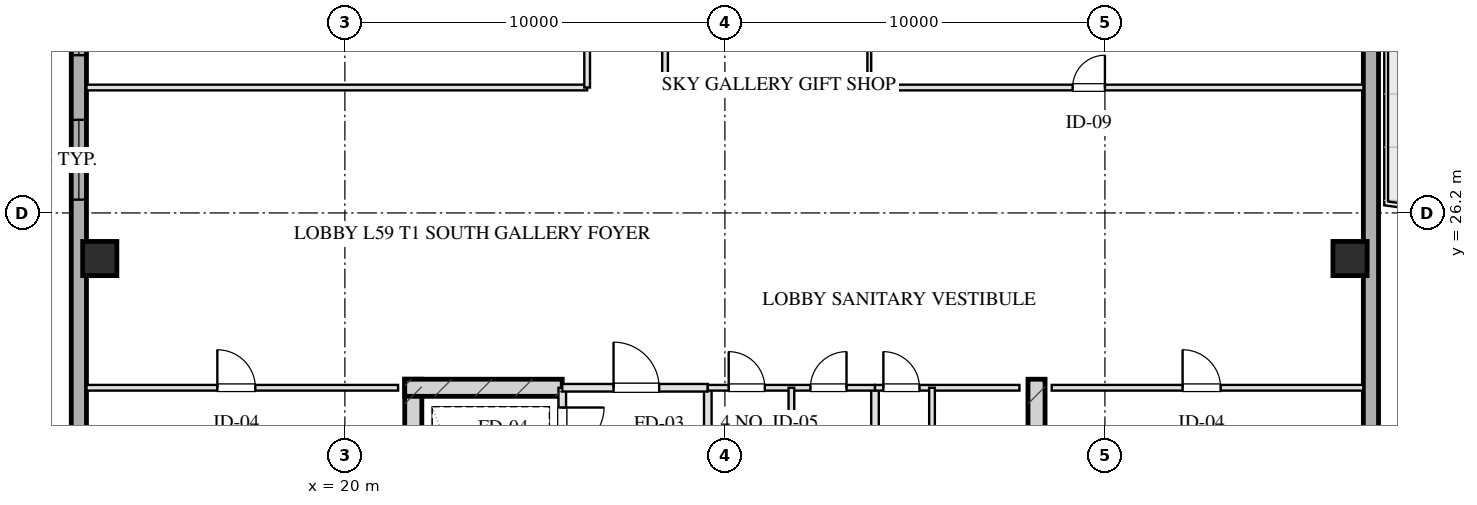
"""IFC4 building model, lengths in metres.
Left out: names, types, materials, properties, quantities, classifications, styles, units other than length and angle.
Written with IfcOpenShell. Run it as: python <this file> out.ifc"""

import sys

from ifc_helpers import new_model, si_unit, direction, frame, frame_2d, origin, origin_2d, place, context, subcontext, project, spatial, rectangle, hollow_rectangle, extrude, element, fill, save


model = new_model("IFC4")
c1 = context("Model", 3, precision=1e-05, world=origin(), true_north=direction((0.0, 1.0)))
c2 = subcontext(c1, "Body", "Model", "MODEL_VIEW")
j1 = project(units=[si_unit("LENGTHUNIT", "METRE"), si_unit("PLANEANGLEUNIT", "RADIAN")], contexts=[c1])
p1 = place(None, origin())
s1 = spatial("IfcSite", under=j1, at=p1, CompositionType="ELEMENT")
p2 = place(p1, origin())
s2 = spatial("IfcBuilding", under=s1, at=p2, CompositionType="ELEMENT")
p3 = place(p2, frame((0.0, 0.0, 219.65)))
s3 = spatial("IfcBuildingStorey", under=s2, at=p3, CompositionType="ELEMENT", Elevation=219.65)
for number, where, z_axis, x_axis in (
    (1, (21.8, 21.825, 0.0), (0.0, 0.0, 1.0), (0.0, -1.0, 0.0)),
    (2, (38.2, 21.825, 0.0), (0.0, 0.0, 1.0), (0.0, -1.0, 0.0)),
):
    element("IfcWall", number, at=place(p3, frame(where, z_axis=z_axis, x_axis=x_axis)), inside=s3, PredefinedType="SHEAR", context=c2, shape_type="SweptSolid", body=[
        extrude(rectangle(XDim=9.33, YDim=0.45, at=frame_2d((4.665, 0.0))), origin(), (0.0, 0.0, 1.0), 3.45),
    ])
p4 = place(p3, frame((21.575, 21.6, 0.0), z_axis=(0.0, 0.0, 1.0), x_axis=(1.0, 0.0, 0.0)))
e3 = element("IfcWall", 3, at=p4, inside=s3, PredefinedType="SHEAR", context=c2, shape_type="SweptSolid", body=[
    extrude(rectangle(XDim=4.145, YDim=0.45, at=frame_2d((2.073, 0.0))), origin(), (0.0, 0.0, 1.0), 3.45),
])
for number, where, z_axis, x_axis in (
    (4, (13.55, 25.0, 0.0), (0.0, 0.0, 1.0), (1.0, 0.0, 0.0)),
    (5, (46.45, 25.0, 0.0), (0.0, 0.0, 1.0), (1.0, 0.0, 0.0)),
):
    element("IfcColumn", number, at=place(p3, frame(where, z_axis=z_axis, x_axis=x_axis)), inside=s3, PredefinedType="COLUMN", context=c2, shape_type="SweptSolid", body=[
        extrude(hollow_rectangle(XDim=0.9, YDim=0.9, WallThickness=0.032, at=origin_2d()), origin(), (0.0, 0.0, 1.0), 3.451),
    ])
p5 = place(p3, frame((13.0, 10.8, 0.0), z_axis=(0.0, 0.0, 1.0), x_axis=(0.0, 1.0, 0.0)))
e6 = element("IfcWall", 6, at=p5, inside=s3, PredefinedType="SOLIDWALL", context=c2, shape_type="SweptSolid", body=[
    extrude(rectangle(XDim=46.4, YDim=0.4, at=frame_2d((23.2, 0.0))), origin(), (0.0, 0.0, 1.0), 2.61),
])
p6 = place(p5, frame((15.75, 0.0, 0.75)))
e7 = element("IfcOpeningElement", 7, at=p6, cuts=e6, PredefinedType="OPENING", context=c2, shape_type="SweptSolid", body=[
    extrude(rectangle(XDim=2.1, YDim=1.46, at=frame_2d((1.05, 0.73))), frame((0.0, 0.21, 0.0), z_axis=(0.0, -1.0, 0.0), x_axis=(1.0, 0.0, 0.0)), (0.0, 0.0, 1.0), 0.42),
])
p7 = place(p5, frame((19.55, 0.0, 0.75)))
e8 = element("IfcOpeningElement", 8, at=p7, cuts=e6, PredefinedType="OPENING", context=c2, shape_type="SweptSolid", body=[
    extrude(rectangle(XDim=2.1, YDim=1.46, at=frame_2d((1.05, 0.73))), frame((0.0, 0.21, 0.0), z_axis=(0.0, -1.0, 0.0), x_axis=(1.0, 0.0, 0.0)), (0.0, 0.0, 1.0), 0.42),
])
p8 = place(p5, frame((24.75, 0.0, 0.75)))
e9 = element("IfcOpeningElement", 9, at=p8, cuts=e6, PredefinedType="OPENING", context=c2, shape_type="SweptSolid", body=[
    extrude(rectangle(XDim=2.1, YDim=1.46, at=frame_2d((1.05, 0.73))), frame((0.0, 0.21, 0.0), z_axis=(0.0, -1.0, 0.0), x_axis=(1.0, 0.0, 0.0)), (0.0, 0.0, 1.0), 0.42),
])
p9 = place(p5, frame((28.55, 0.0, 0.75)))
e10 = element("IfcOpeningElement", 10, at=p9, cuts=e6, PredefinedType="OPENING", context=c2, shape_type="SweptSolid", body=[
    extrude(rectangle(XDim=2.1, YDim=1.46, at=frame_2d((1.05, 0.73))), frame((0.0, 0.21, 0.0), z_axis=(0.0, -1.0, 0.0), x_axis=(1.0, 0.0, 0.0)), (0.0, 0.0, 1.0), 0.42),
])
p10 = place(p3, frame((47.0, 57.2, 0.0), z_axis=(0.0, 0.0, 1.0), x_axis=(0.0, -1.0, 0.0)))
e11 = element("IfcWall", 11, at=p10, inside=s3, PredefinedType="SOLIDWALL", context=c2, shape_type="SweptSolid", body=[
    extrude(rectangle(XDim=46.4, YDim=0.4, at=frame_2d((23.2, 0.0))), origin(), (0.0, 0.0, 1.0), 2.61),
])
p11 = place(p10, frame((20.85, 0.0, 0.0)))
e12 = element("IfcOpeningElement", 12, at=p11, cuts=e11, PredefinedType="OPENING", context=c2, shape_type="SweptSolid", body=[
    extrude(rectangle(XDim=1.8, YDim=2.2, at=frame_2d((0.9, 1.1))), frame((0.0, 0.21, 0.0), z_axis=(0.0, -1.0, 0.0), x_axis=(1.0, 0.0, 0.0)), (0.0, 0.0, 1.0), 0.42),
])
p12 = place(p3, frame((77.453, 26.664, 0.0), z_axis=(0.0, 0.0, 1.0), x_axis=(-0.990242401523, 0.13935561067, 0.0)))
e13 = element("IfcWall", 13, at=p12, inside=s3, PredefinedType="SOLIDWALL", context=c2, shape_type="SweptSolid", body=[
    extrude(rectangle(XDim=30.399, YDim=0.35, at=frame_2d((15.2, 0.0))), origin(), (0.0, 0.0, 1.0), 3.4),
])
p13 = place(p12, frame((6.5, 0.0, 0.0)))
e14 = element("IfcOpeningElement", 14, at=p13, cuts=e13, PredefinedType="OPENING", context=c2, shape_type="SweptSolid", body=[
    extrude(rectangle(XDim=1.1, YDim=2.15, at=frame_2d((0.55, 1.075))), frame((0.0, 0.185, 0.0), z_axis=(0.0, -1.0, 0.0), x_axis=(1.0, 0.0, 0.0)), (0.0, 0.0, 1.0), 0.37),
])
p14 = place(p3, frame((25.72, 21.6, 0.0), z_axis=(0.0, 0.0, 1.0), x_axis=(0.0, -1.0, 0.0)))
e15 = element("IfcWall", 15, at=p14, inside=s3, PredefinedType="PARTITIONING", context=c2, shape_type="SweptSolid", body=[
    extrude(rectangle(XDim=1.9, YDim=0.2, at=frame_2d((0.95, 0.0))), origin(), (0.0, 0.0, 1.0), 3.175),
])
p15 = place(p14, frame((0.52, 0.0, 0.0)))
e16 = element("IfcOpeningElement", 16, at=p15, cuts=e15, PredefinedType="OPENING", context=c2, shape_type="SweptSolid", body=[
    extrude(rectangle(XDim=1.1, YDim=2.05, at=frame_2d((0.55, 1.025))), frame((0.0, 0.11, 0.0), z_axis=(0.0, -1.0, 0.0), x_axis=(1.0, 0.0, 0.0)), (0.0, 0.0, 1.0), 0.22),
])
p16 = place(p3, frame((29.55, 21.6, 0.0), z_axis=(0.0, 0.0, 1.0), x_axis=(0.0, -1.0, 0.0)))
e17 = element("IfcWall", 17, at=p16, inside=s3, PredefinedType="PARTITIONING", context=c2, shape_type="SweptSolid", body=[
    extrude(rectangle(XDim=8.43, YDim=0.2, at=frame_2d((4.215, 0.0))), origin(), (0.0, 0.0, 1.0), 3.175),
])
p17 = place(p3, frame((25.72, 21.6, 0.0), z_axis=(0.0, 0.0, 1.0), x_axis=(1.0, 0.0, 0.0)))
e18 = element("IfcWall", 18, at=p17, inside=s3, PredefinedType="PARTITIONING", context=c2, shape_type="SweptSolid", body=[
    extrude(rectangle(XDim=3.83, YDim=0.2, at=frame_2d((1.915, 0.0))), origin(), (0.0, 0.0, 1.0), 3.175),
])
p18 = place(p17, frame((1.35, 0.0, 0.0)))
e19 = element("IfcOpeningElement", 19, at=p18, cuts=e18, PredefinedType="OPENING", context=c2, shape_type="SweptSolid", body=[
    extrude(rectangle(XDim=1.2, YDim=2.05, at=frame_2d((0.6, 1.025))), frame((0.0, 0.11, 0.0), z_axis=(0.0, -1.0, 0.0), x_axis=(1.0, 0.0, 0.0)), (0.0, 0.0, 1.0), 0.22),
])
p19 = place(p3, frame((33.95, 21.6, 0.0), z_axis=(0.0, 0.0, 1.0), x_axis=(0.0, -1.0, 0.0)))
e20 = element("IfcWall", 20, at=p19, inside=s3, PredefinedType="PARTITIONING", context=c2, shape_type="SweptSolid", body=[
    extrude(rectangle(XDim=8.43, YDim=0.2, at=frame_2d((4.215, 0.0))), origin(), (0.0, 0.0, 1.0), 3.175),
])
p20 = place(p3, frame((29.55, 21.6, 0.0), z_axis=(0.0, 0.0, 1.0), x_axis=(1.0, 0.0, 0.0)))
e21 = element("IfcWall", 21, at=p20, inside=s3, PredefinedType="PARTITIONING", context=c2, shape_type="SweptSolid", body=[
    extrude(rectangle(XDim=4.4, YDim=0.15, at=frame_2d((2.2, 0.0))), origin(), (0.0, 0.0, 1.0), 3.175),
])
p21 = place(p20, frame((0.55, 0.0, 0.0)))
e22 = element("IfcOpeningElement", 22, at=p21, cuts=e21, PredefinedType="OPENING", context=c2, shape_type="SweptSolid", body=[
    extrude(rectangle(XDim=0.95, YDim=2.05, at=frame_2d((0.475, 1.025))), frame((0.0, 0.085, 0.0), z_axis=(0.0, -1.0, 0.0), x_axis=(1.0, 0.0, 0.0)), (0.0, 0.0, 1.0), 0.17),
])
p22 = place(p20, frame((2.7, 0.0, 0.0)))
e23 = element("IfcOpeningElement", 23, at=p22, cuts=e21, PredefinedType="OPENING", context=c2, shape_type="SweptSolid", body=[
    extrude(rectangle(XDim=0.95, YDim=2.05, at=frame_2d((0.475, 1.025))), frame((0.0, 0.085, 0.0), z_axis=(0.0, -1.0, 0.0), x_axis=(1.0, 0.0, 0.0)), (0.0, 0.0, 1.0), 0.17),
])
p23 = place(p3, frame((31.75, 21.6, 0.0), z_axis=(0.0, 0.0, 1.0), x_axis=(0.0, -1.0, 0.0)))
e24 = element("IfcWall", 24, at=p23, inside=s3, PredefinedType="PARTITIONING", context=c2, shape_type="SweptSolid", body=[
    extrude(rectangle(XDim=8.43, YDim=0.15, at=frame_2d((4.215, 0.0))), origin(), (0.0, 0.0, 1.0), 3.175),
])
p24 = place(p3, frame((33.95, 21.6, 0.0), z_axis=(0.0, 0.0, 1.0), x_axis=(1.0, 0.0, 0.0)))
e25 = element("IfcWall", 25, at=p24, inside=s3, PredefinedType="PARTITIONING", context=c2, shape_type="SweptSolid", body=[
    extrude(rectangle(XDim=3.8, YDim=0.15, at=frame_2d((1.9, 0.0))), origin(), (0.0, 0.0, 1.0), 3.175),
])
p25 = place(p24, frame((0.22, 0.0, 0.0)))
e26 = element("IfcOpeningElement", 26, at=p25, cuts=e25, PredefinedType="OPENING", context=c2, shape_type="SweptSolid", body=[
    extrude(rectangle(XDim=0.95, YDim=2.05, at=frame_2d((0.475, 1.025))), frame((0.0, 0.085, 0.0), z_axis=(0.0, -1.0, 0.0), x_axis=(1.0, 0.0, 0.0)), (0.0, 0.0, 1.0), 0.17),
])
p26 = place(p3, frame((35.45, 21.6, 0.0), z_axis=(0.0, 0.0, 1.0), x_axis=(0.0, -1.0, 0.0)))
e27 = element("IfcWall", 27, at=p26, inside=s3, PredefinedType="PARTITIONING", context=c2, shape_type="SweptSolid", body=[
    extrude(rectangle(XDim=8.43, YDim=0.15, at=frame_2d((4.215, 0.0))), origin(), (0.0, 0.0, 1.0), 2.815),
])
p27 = place(p26, frame((2.55, 0.0, 0.0)))
e28 = element("IfcOpeningElement", 28, at=p27, cuts=e27, PredefinedType="OPENING", context=c2, shape_type="SweptSolid", body=[
    extrude(rectangle(XDim=0.95, YDim=2.05, at=frame_2d((0.475, 1.025))), frame((0.0, 0.085, 0.0), z_axis=(0.0, -1.0, 0.0), x_axis=(1.0, 0.0, 0.0)), (0.0, 0.0, 1.0), 0.17),
])
p28 = place(p26, frame((4.7, 0.0, 0.0)))
e29 = element("IfcOpeningElement", 29, at=p28, cuts=e27, PredefinedType="OPENING", context=c2, shape_type="SweptSolid", body=[
    extrude(rectangle(XDim=0.9, YDim=2.05, at=frame_2d((0.45, 1.025))), frame((0.0, 0.085, 0.0), z_axis=(0.0, -1.0, 0.0), x_axis=(1.0, 0.0, 0.0)), (0.0, 0.0, 1.0), 0.17),
])
p29 = place(p26, frame((6.8, 0.0, 0.0)))
e30 = element("IfcOpeningElement", 30, at=p29, cuts=e27, PredefinedType="OPENING", context=c2, shape_type="SweptSolid", body=[
    extrude(rectangle(XDim=0.9, YDim=2.05, at=frame_2d((0.45, 1.025))), frame((0.0, 0.085, 0.0), z_axis=(0.0, -1.0, 0.0), x_axis=(1.0, 0.0, 0.0)), (0.0, 0.0, 1.0), 0.17),
])
p30 = place(p3, frame((13.2, 21.6, 0.0), z_axis=(0.0, 0.0, 1.0), x_axis=(1.0, 0.0, 0.0)))
e31 = element("IfcWall", 31, at=p30, inside=s3, PredefinedType="PARTITIONING", context=c2, shape_type="SweptSolid", body=[
    extrude(rectangle(XDim=8.2, YDim=0.15, at=frame_2d((4.1, 0.0))), origin(), (0.0, 0.0, 1.0), 3.175),
])
p31 = place(p30, frame((3.444, 0.0, 0.0)))
e32 = element("IfcOpeningElement", 32, at=p31, cuts=e31, PredefinedType="OPENING", context=c2, shape_type="SweptSolid", body=[
    extrude(rectangle(XDim=1.0, YDim=2.05, at=frame_2d((0.5, 1.025))), frame((0.0, 0.085, 0.0), z_axis=(0.0, -1.0, 0.0), x_axis=(1.0, 0.0, 0.0)), (0.0, 0.0, 1.0), 0.17),
])
p32 = place(p3, frame((38.6, 21.6, 0.0), z_axis=(0.0, 0.0, 1.0), x_axis=(1.0, 0.0, 0.0)))
e33 = element("IfcWall", 33, at=p32, inside=s3, PredefinedType="PARTITIONING", context=c2, shape_type="SweptSolid", body=[
    extrude(rectangle(XDim=8.2, YDim=0.15, at=frame_2d((4.1, 0.0))), origin(), (0.0, 0.0, 1.0), 3.175),
])
p33 = place(p32, frame((3.444, 0.0, 0.0)))
e34 = element("IfcOpeningElement", 34, at=p33, cuts=e33, PredefinedType="OPENING", context=c2, shape_type="SweptSolid", body=[
    extrude(rectangle(XDim=1.0, YDim=2.05, at=frame_2d((0.5, 1.025))), frame((0.0, 0.085, 0.0), z_axis=(0.0, -1.0, 0.0), x_axis=(1.0, 0.0, 0.0)), (0.0, 0.0, 1.0), 0.17),
])
p34 = place(p3, frame((13.2, 29.5, 0.0), z_axis=(0.0, 0.0, 1.0), x_axis=(1.0, 0.0, 0.0)))
e35 = element("IfcWall", 35, at=p34, inside=s3, PredefinedType="PARTITIONING", context=c2, shape_type="SweptSolid", body=[
    extrude(rectangle(XDim=13.175, YDim=0.15, at=frame_2d((6.587, 0.0))), origin(), (0.0, 0.0, 1.0), 3.175),
])
p35 = place(p3, frame((28.425, 29.5, 0.0), z_axis=(0.0, 0.0, 1.0), x_axis=(1.0, 0.0, 0.0)))
e36 = element("IfcWall", 36, at=p35, inside=s3, PredefinedType="PARTITIONING", context=c2, shape_type="SweptSolid", body=[
    extrude(rectangle(XDim=18.375, YDim=0.15, at=frame_2d((9.188, 0.0))), origin(), (0.0, 0.0, 1.0), 3.175),
])
p36 = place(p35, frame((10.725, 0.0, 0.0)))
e37 = element("IfcOpeningElement", 37, at=p36, cuts=e36, PredefinedType="OPENING", context=c2, shape_type="SweptSolid", body=[
    extrude(rectangle(XDim=0.85, YDim=2.05, at=frame_2d((0.425, 1.025))), frame((0.0, 0.085, 0.0), z_axis=(0.0, -1.0, 0.0), x_axis=(1.0, 0.0, 0.0)), (0.0, 0.0, 1.0), 0.17),
])
p37 = place(p3, frame((26.375, 29.5, 0.0), z_axis=(0.0, 0.0, 1.0), x_axis=(0.0, 1.0, 0.0)))
e38 = element("IfcWall", 38, at=p37, inside=s3, PredefinedType="PARTITIONING", context=c2, shape_type="SweptSolid", body=[
    extrude(rectangle(XDim=9.0, YDim=0.15, at=frame_2d((4.5, 0.0))), origin(), (0.0, 0.0, 1.0), 3.175),
])
p38 = place(p37, frame((1.16, 0.0, 0.0)))
e39 = element("IfcOpeningElement", 39, at=p38, cuts=e38, PredefinedType="OPENING", context=c2, shape_type="SweptSolid", body=[
    extrude(rectangle(XDim=1.0, YDim=2.05, at=frame_2d((0.5, 1.025))), frame((0.0, 0.085, 0.0), z_axis=(0.0, -1.0, 0.0), x_axis=(1.0, 0.0, 0.0)), (0.0, 0.0, 1.0), 0.17),
])
p39 = place(p37, frame((5.66, 0.0, 0.0)))
e40 = element("IfcOpeningElement", 40, at=p39, cuts=e38, PredefinedType="OPENING", context=c2, shape_type="SweptSolid", body=[
    extrude(rectangle(XDim=1.05, YDim=2.05, at=frame_2d((0.525, 1.025))), frame((0.0, 0.085, 0.0), z_axis=(0.0, -1.0, 0.0), x_axis=(1.0, 0.0, 0.0)), (0.0, 0.0, 1.0), 0.17),
])
p40 = place(p3, frame((28.425, 29.5, 0.0), z_axis=(0.0, 0.0, 1.0), x_axis=(0.0, 1.0, 0.0)))
e41 = element("IfcWall", 41, at=p40, inside=s3, PredefinedType="PARTITIONING", context=c2, shape_type="SweptSolid", body=[
    extrude(rectangle(XDim=9.0, YDim=0.15, at=frame_2d((4.5, 0.0))), origin(), (0.0, 0.0, 1.0), 3.175),
])
p41 = place(p40, frame((1.16, 0.0, 0.0)))
e42 = element("IfcOpeningElement", 42, at=p41, cuts=e41, PredefinedType="OPENING", context=c2, shape_type="SweptSolid", body=[
    extrude(rectangle(XDim=1.0, YDim=2.05, at=frame_2d((0.5, 1.025))), frame((0.0, 0.085, 0.0), z_axis=(0.0, -1.0, 0.0), x_axis=(1.0, 0.0, 0.0)), (0.0, 0.0, 1.0), 0.17),
])
p42 = place(p40, frame((5.56, 0.0, 0.0)))
e43 = element("IfcOpeningElement", 43, at=p42, cuts=e41, PredefinedType="OPENING", context=c2, shape_type="SweptSolid", body=[
    extrude(rectangle(XDim=1.2, YDim=2.05, at=frame_2d((0.6, 1.025))), frame((0.0, 0.085, 0.0), z_axis=(0.0, -1.0, 0.0), x_axis=(1.0, 0.0, 0.0)), (0.0, 0.0, 1.0), 0.17),
])
p43 = place(p3, frame((33.8, 29.5, 0.0), z_axis=(0.0, 0.0, 1.0), x_axis=(0.0, 1.0, 0.0)))
e44 = element("IfcWall", 44, at=p43, inside=s3, PredefinedType="MOVABLE", context=c2, shape_type="SweptSolid", body=[
    extrude(rectangle(XDim=3.32, YDim=0.1, at=frame_2d((1.66, 0.0))), origin(), (0.0, 0.0, 1.0), 3.175),
])
p44 = place(p3, frame((46.45, 34.5, 0.0), z_axis=(0.0, 0.0, 1.0), x_axis=(0.988149988354, -0.153491369519, 0.0)))
e45 = element("IfcWall", 45, at=p44, inside=s3, PredefinedType="MOVABLE", context=c2, shape_type="SweptSolid", body=[
    extrude(rectangle(XDim=29.405, YDim=0.1, at=frame_2d((14.703, 0.0))), origin(), (0.0, 0.0, 1.0), 3.175),
])
p45 = place(p44, frame((3.2, 0.0, 0.0)))
e46 = element("IfcOpeningElement", 46, at=p45, cuts=e45, PredefinedType="OPENING", context=c2, shape_type="SweptSolid", body=[
    extrude(rectangle(XDim=1.0, YDim=2.05, at=frame_2d((0.5, 1.025))), frame((0.0, 0.06, 0.0), z_axis=(0.0, -1.0, 0.0), x_axis=(1.0, 0.0, 0.0)), (0.0, 0.0, 1.0), 0.12),
])
p46 = place(p44, frame((10.5, 0.0, 0.0)))
e47 = element("IfcOpeningElement", 47, at=p46, cuts=e45, PredefinedType="OPENING", context=c2, shape_type="SweptSolid", body=[
    extrude(rectangle(XDim=1.1, YDim=2.05, at=frame_2d((0.55, 1.025))), frame((0.0, 0.06, 0.0), z_axis=(0.0, -1.0, 0.0), x_axis=(1.0, 0.0, 0.0)), (0.0, 0.0, 1.0), 0.12),
])
p47 = place(p44, frame((22.8, 0.0, 0.0)))
e48 = element("IfcOpeningElement", 48, at=p47, cuts=e45, PredefinedType="OPENING", context=c2, shape_type="SweptSolid", body=[
    extrude(rectangle(XDim=1.1, YDim=2.05, at=frame_2d((0.55, 1.025))), frame((0.0, 0.06, 0.0), z_axis=(0.0, -1.0, 0.0), x_axis=(1.0, 0.0, 0.0)), (0.0, 0.0, 1.0), 0.12),
])
p48 = place(p6, origin())
e49 = element("IfcWindow", 49, at=p48, inside=s3, PartitioningType="TRIPLE_PANEL_VERTICAL", PredefinedType="WINDOW", context=c2, shape_type="SweptSolid", body=[
    extrude(rectangle(XDim=2.1, YDim=1.46, at=frame_2d((1.05, 0.73))), frame((0.0, 0.03, 0.0), z_axis=(0.0, -1.0, 0.0), x_axis=(1.0, 0.0, 0.0)), (0.0, 0.0, 1.0), 0.06),
])
fill(e7, e49)
p49 = place(p7, origin())
e50 = element("IfcWindow", 50, at=p49, inside=s3, PartitioningType="TRIPLE_PANEL_VERTICAL", PredefinedType="WINDOW", context=c2, shape_type="SweptSolid", body=[
    extrude(rectangle(XDim=2.1, YDim=1.46, at=frame_2d((1.05, 0.73))), frame((0.0, 0.03, 0.0), z_axis=(0.0, -1.0, 0.0), x_axis=(1.0, 0.0, 0.0)), (0.0, 0.0, 1.0), 0.06),
])
fill(e8, e50)
p50 = place(p15, origin())
e51 = element("IfcDoor", 51, at=p50, inside=s3, OperationType="SINGLE_SWING_LEFT", PredefinedType="DOOR", context=c2, shape_type="SweptSolid", body=[
    extrude(rectangle(XDim=1.1, YDim=2.05, at=frame_2d((0.55, 1.025))), frame((0.0, 0.025, 0.0), z_axis=(0.0, -1.0, 0.0), x_axis=(1.0, 0.0, 0.0)), (0.0, 0.0, 1.0), 0.05),
])
fill(e16, e51)
p51 = place(p18, origin())
e52 = element("IfcDoor", 52, at=p51, inside=s3, OperationType="SINGLE_SWING_LEFT", PredefinedType="DOOR", context=c2, shape_type="SweptSolid", body=[
    extrude(rectangle(XDim=1.2, YDim=2.05, at=frame_2d((0.6, 1.025))), frame((0.0, 0.025, 0.0), z_axis=(0.0, -1.0, 0.0), x_axis=(1.0, 0.0, 0.0)), (0.0, 0.0, 1.0), 0.05),
])
fill(e19, e52)
p52 = place(p21, origin())
e53 = element("IfcDoor", 53, at=p52, inside=s3, OperationType="SINGLE_SWING_LEFT", PredefinedType="DOOR", context=c2, shape_type="SweptSolid", body=[
    extrude(rectangle(XDim=0.95, YDim=2.05, at=frame_2d((0.475, 1.025))), frame((0.0, 0.025, 0.0), z_axis=(0.0, -1.0, 0.0), x_axis=(1.0, 0.0, 0.0)), (0.0, 0.0, 1.0), 0.05),
])
fill(e22, e53)
p53 = place(p22, origin())
e54 = element("IfcDoor", 54, at=p53, inside=s3, OperationType="SINGLE_SWING_RIGHT", PredefinedType="DOOR", context=c2, shape_type="SweptSolid", body=[
    extrude(rectangle(XDim=0.95, YDim=2.05, at=frame_2d((0.475, 1.025))), frame((0.0, 0.025, 0.0), z_axis=(0.0, -1.0, 0.0), x_axis=(1.0, 0.0, 0.0)), (0.0, 0.0, 1.0), 0.05),
])
fill(e23, e54)
p54 = place(p25, origin())
e55 = element("IfcDoor", 55, at=p54, inside=s3, OperationType="SINGLE_SWING_LEFT", PredefinedType="DOOR", context=c2, shape_type="SweptSolid", body=[
    extrude(rectangle(XDim=0.95, YDim=2.05, at=frame_2d((0.475, 1.025))), frame((0.0, 0.025, 0.0), z_axis=(0.0, -1.0, 0.0), x_axis=(1.0, 0.0, 0.0)), (0.0, 0.0, 1.0), 0.05),
])
fill(e26, e55)
p55 = place(p31, origin())
e56 = element("IfcDoor", 56, at=p55, inside=s3, OperationType="SINGLE_SWING_LEFT", PredefinedType="DOOR", context=c2, shape_type="SweptSolid", body=[
    extrude(rectangle(XDim=1.0, YDim=2.05, at=frame_2d((0.5, 1.025))), frame((0.0, 0.025, 0.0), z_axis=(0.0, -1.0, 0.0), x_axis=(1.0, 0.0, 0.0)), (0.0, 0.0, 1.0), 0.05),
])
fill(e32, e56)
p56 = place(p33, origin())
e57 = element("IfcDoor", 57, at=p56, inside=s3, OperationType="SINGLE_SWING_LEFT", PredefinedType="DOOR", context=c2, shape_type="SweptSolid", body=[
    extrude(rectangle(XDim=1.0, YDim=2.05, at=frame_2d((0.5, 1.025))), frame((0.0, 0.025, 0.0), z_axis=(0.0, -1.0, 0.0), x_axis=(1.0, 0.0, 0.0)), (0.0, 0.0, 1.0), 0.05),
])
fill(e34, e57)
p57 = place(p36, origin())
e58 = element("IfcDoor", 58, at=p57, inside=s3, OperationType="SINGLE_SWING_RIGHT", PredefinedType="DOOR", context=c2, shape_type="SweptSolid", body=[
    extrude(rectangle(XDim=0.85, YDim=2.05, at=frame_2d((0.425, 1.025))), frame((0.0, 0.025, 0.0), z_axis=(0.0, -1.0, 0.0), x_axis=(1.0, 0.0, 0.0)), (0.0, 0.0, 1.0), 0.05),
])
fill(e37, e58)
save(model, sys.argv[1])
